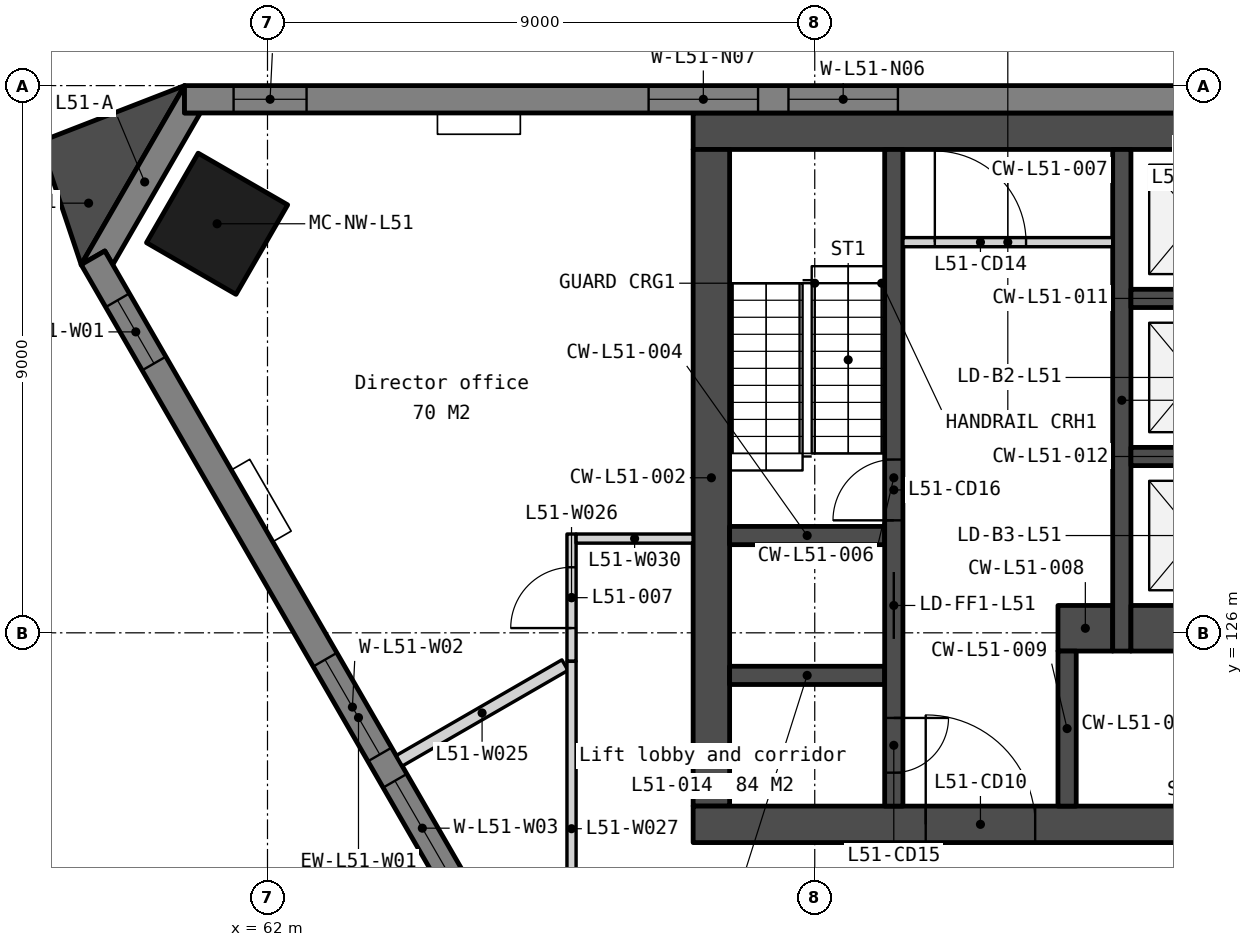
"""IFC4 building model, lengths in metres.
Left out: names, types, materials, properties, quantities, classifications, styles, units other than length and angle.
Written with IfcOpenShell. Run it as: python <this file> out.ifc"""

import sys

from ifc_helpers import new_model, si_unit, direction, frame, frame_2d, origin, origin_2d, place, context, subcontext, project, spatial, polyline, rectangle, outline, extrude, element, fill, save


model = new_model("IFC4")
c1 = context("Model", 3, precision=1e-05, world=origin(), true_north=direction((0.0, 1.0)))
c2 = subcontext(c1, "Body", "Model", "MODEL_VIEW")
j1 = project(units=[si_unit("LENGTHUNIT", "METRE"), si_unit("PLANEANGLEUNIT", "RADIAN")], contexts=[c1])
p1 = place(None, origin())
s1 = spatial("IfcSite", under=j1, at=p1, CompositionType="ELEMENT")
p2 = place(p1, origin())
s2 = spatial("IfcBuilding", under=s1, at=p2, CompositionType="ELEMENT")
p3 = place(p2, frame((0.0, 0.0, 203.6)))
s3 = spatial("IfcBuildingStorey", under=s2, at=p3, CompositionType="ELEMENT", Elevation=203.6)
p4 = place(p3, frame((61.171, 132.728, 0.0), z_axis=(0.0, 0.0, 1.0), x_axis=(-0.5, -0.866025403784, 0.0)))
e1 = element("IfcColumn", 1, at=p4, inside=s3, PredefinedType="COLUMN", context=c2, shape_type="SweptSolid", body=[
    extrude(rectangle(XDim=1.7, YDim=1.7, at=origin_2d()), origin(), (0.0, 0.0, 1.0), 3.9),
])
p5 = place(p3, frame((69.0, 134.25, 0.0), z_axis=(0.0, 0.0, 1.0), x_axis=(1.0, 0.0, 0.0)))
e2 = element("IfcWall", 2, at=p5, inside=s3, PredefinedType="SOLIDWALL", context=c2, shape_type="SweptSolid", body=[
    extrude(rectangle(XDim=22.0, YDim=0.6, at=frame_2d((11.0, 0.0))), origin(), (0.0, 0.0, 1.0), 3.75),
])
p6 = place(p3, frame((69.3, 133.95, 0.0), z_axis=(0.0, 0.0, 1.0), x_axis=(0.0, -1.0, 0.0)))
e3 = element("IfcWall", 3, at=p6, inside=s3, PredefinedType="SOLIDWALL", context=c2, shape_type="SweptSolid", body=[
    extrude(rectangle(XDim=10.8, YDim=0.6, at=frame_2d((5.4, 0.0))), origin(), (0.0, 0.0, 1.0), 3.75),
])
p7 = place(p3, frame((69.0, 122.85, 0.0), z_axis=(0.0, 0.0, 1.0), x_axis=(1.0, 0.0, 0.0)))
e4 = element("IfcWall", 4, at=p7, inside=s3, PredefinedType="SOLIDWALL", context=c2, shape_type="SweptSolid", body=[
    extrude(rectangle(XDim=22.0, YDim=0.6, at=frame_2d((11.0, 0.0))), origin(), (0.0, 0.0, 1.0), 3.75),
])
p8 = place(p7, frame((16.375, 0.0, 0.0)))
e5 = element("IfcOpeningElement", 5, at=p8, cuts=e4, PredefinedType="OPENING", context=c2, shape_type="SweptSolid", body=[
    extrude(rectangle(XDim=1.8, YDim=2.1, at=frame_2d((0.9, 1.05))), frame((0.0, 0.31, 0.0), z_axis=(0.0, -1.0, 0.0), x_axis=(1.0, 0.0, 0.0)), (0.0, 0.0, 1.0), 0.62),
])
p9 = place(p7, frame((3.825, 0.0, 0.0)))
e6 = element("IfcOpeningElement", 6, at=p9, cuts=e4, PredefinedType="OPENING", context=c2, shape_type="SweptSolid", body=[
    extrude(rectangle(XDim=1.8, YDim=2.1, at=frame_2d((0.9, 1.05))), frame((0.0, 0.31, 0.0), z_axis=(0.0, -1.0, 0.0), x_axis=(1.0, 0.0, 0.0)), (0.0, 0.0, 1.0), 0.62),
])
p10 = place(p7, frame((12.85, 0.0, 0.0)))
e7 = element("IfcOpeningElement", 7, at=p10, cuts=e4, PredefinedType="OPENING", context=c2, shape_type="SweptSolid", body=[
    extrude(rectangle(XDim=1.5, YDim=2.1, at=frame_2d((0.75, 1.05))), frame((0.0, 0.31, 0.0), z_axis=(0.0, -1.0, 0.0), x_axis=(1.0, 0.0, 0.0)), (0.0, 0.0, 1.0), 0.62),
])
for number, where, z_axis, x_axis in (
    (8, (69.6, 127.6, 0.0), (0.0, 0.0, 1.0), (1.0, 0.0, 0.0)),
    (9, (69.6, 125.3, 0.0), (0.0, 0.0, 1.0), (1.0, 0.0, 0.0)),
):
    element("IfcWall", number, at=place(p3, frame(where, z_axis=z_axis, x_axis=x_axis)), inside=s3, PredefinedType="SOLIDWALL", context=c2, shape_type="SweptSolid", body=[
        extrude(rectangle(XDim=2.55, YDim=0.3, at=frame_2d((1.275, 0.0))), origin(), (0.0, 0.0, 1.0), 3.75),
    ])
p11 = place(p3, frame((72.3, 133.95, 0.0), z_axis=(0.0, 0.0, 1.0), x_axis=(0.0, -1.0, 0.0)))
e10 = element("IfcWall", 10, at=p11, inside=s3, PredefinedType="SOLIDWALL", context=c2, shape_type="SweptSolid", body=[
    extrude(rectangle(XDim=10.8, YDim=0.3, at=frame_2d((5.4, 0.0))), origin(), (0.0, 0.0, 1.0), 3.75),
])
p12 = place(p11, frame((6.95, 0.0, 0.0)))
e11 = element("IfcOpeningElement", 11, at=p12, cuts=e10, PredefinedType="OPENING", context=c2, shape_type="SweptSolid", body=[
    extrude(rectangle(XDim=1.1, YDim=2.1, at=frame_2d((0.55, 1.05))), frame((0.0, 0.16, 0.0), z_axis=(0.0, -1.0, 0.0), x_axis=(1.0, 0.0, 0.0)), (0.0, 0.0, 1.0), 0.32),
])
p13 = place(p11, frame((9.35, 0.0, 0.0)))
e12 = element("IfcOpeningElement", 12, at=p13, cuts=e10, PredefinedType="OPENING", context=c2, shape_type="SweptSolid", body=[
    extrude(rectangle(XDim=0.9, YDim=2.1, at=frame_2d((0.45, 1.05))), frame((0.0, 0.16, 0.0), z_axis=(0.0, -1.0, 0.0), x_axis=(1.0, 0.0, 0.0)), (0.0, 0.0, 1.0), 0.32),
])
p14 = place(p11, frame((5.1, 0.0, 0.0)))
e13 = element("IfcOpeningElement", 13, at=p14, cuts=e10, PredefinedType="OPENING", context=c2, shape_type="SweptSolid", body=[
    extrude(rectangle(XDim=1.0, YDim=2.1, at=frame_2d((0.5, 1.05))), frame((0.0, 0.16, 0.0), z_axis=(0.0, -1.0, 0.0), x_axis=(1.0, 0.0, 0.0)), (0.0, 0.0, 1.0), 0.32),
])
p15 = place(p3, frame((72.45, 132.425, 0.0), z_axis=(0.0, 0.0, 1.0), x_axis=(1.0, 0.0, 0.0)))
e14 = element("IfcWall", 14, at=p15, inside=s3, PredefinedType="PARTITIONING", context=c2, shape_type="SweptSolid", body=[
    extrude(rectangle(XDim=3.45, YDim=0.15, at=frame_2d((1.725, 0.0))), origin(), (0.0, 0.0, 1.0), 3.75),
])
p16 = place(p15, frame((0.525, 0.0, 0.0)))
e15 = element("IfcOpeningElement", 15, at=p16, cuts=e14, PredefinedType="OPENING", context=c2, shape_type="SweptSolid", body=[
    extrude(rectangle(XDim=1.5, YDim=2.1, at=frame_2d((0.75, 1.05))), frame((0.0, 0.085, 0.0), z_axis=(0.0, -1.0, 0.0), x_axis=(1.0, 0.0, 0.0)), (0.0, 0.0, 1.0), 0.17),
])
p17 = place(p3, frame((75.0, 126.075, 0.0), z_axis=(0.0, 0.0, 1.0), x_axis=(1.0, 0.0, 0.0)))
e16 = element("IfcWall", 16, at=p17, inside=s3, PredefinedType="SOLIDWALL", context=c2, shape_type="SweptSolid", body=[
    extrude(rectangle(XDim=0.9, YDim=0.75, at=frame_2d((0.45, 0.0))), origin(), (0.0, 0.0, 1.0), 3.75),
])
p18 = place(p3, frame((75.15, 125.7, 0.0), z_axis=(0.0, 0.0, 1.0), x_axis=(0.0, -1.0, 0.0)))
e17 = element("IfcWall", 17, at=p18, inside=s3, PredefinedType="SOLIDWALL", context=c2, shape_type="SweptSolid", body=[
    extrude(rectangle(XDim=2.55, YDim=0.3, at=frame_2d((1.275, 0.0))), origin(), (0.0, 0.0, 1.0), 3.75),
])
p19 = place(p3, frame((76.05, 133.95, 0.0), z_axis=(0.0, 0.0, 1.0), x_axis=(0.0, -1.0, 0.0)))
e18 = element("IfcWall", 18, at=p19, inside=s3, PredefinedType="SOLIDWALL", context=c2, shape_type="SweptSolid", body=[
    extrude(rectangle(XDim=8.25, YDim=0.3, at=frame_2d((4.125, 0.0))), origin(), (0.0, 0.0, 1.0), 3.75),
])
for number, where, z_axis, x_axis in (
    (19, (76.2, 131.5, 0.0), (0.0, 0.0, 1.0), (1.0, 0.0, 0.0)),
    (20, (76.2, 128.9, 0.0), (0.0, 0.0, 1.0), (1.0, 0.0, 0.0)),
):
    element("IfcWall", number, at=place(p3, frame(where, z_axis=z_axis, x_axis=x_axis)), inside=s3, PredefinedType="SOLIDWALL", context=c2, shape_type="SweptSolid", body=[
        extrude(rectangle(XDim=2.1, YDim=0.3, at=frame_2d((1.05, 0.0))), origin(), (0.0, 0.0, 1.0), 3.75),
    ])
p20 = place(p3, frame((76.2, 126.075, 0.0), z_axis=(0.0, 0.0, 1.0), x_axis=(1.0, 0.0, 0.0)))
e21 = element("IfcWall", 21, at=p20, inside=s3, PredefinedType="SOLIDWALL", context=c2, shape_type="SweptSolid", body=[
    extrude(rectangle(XDim=2.1, YDim=0.75, at=frame_2d((1.05, 0.0))), origin(), (0.0, 0.0, 1.0), 3.75),
])
p21 = place(p3, frame((0.0, 0.0, -0.15)))
e22 = element("IfcWall", 22, at=p21, inside=s3, PredefinedType="SOLIDWALL", context=c2, shape_type="SweptSolid", body=[
    extrude(outline(polyline([(60.635, 135.0), (60.635, 134.55), (60.895, 134.55), (59.455, 132.055), (59.325, 132.281), (58.935, 132.055), (60.635, 135.0)])), origin(), (0.0, 0.0, 1.0), 3.9),
])
p22 = place(p3, frame((99.365, 134.775, -0.15), z_axis=(0.0, 0.0, 1.0), x_axis=(-1.0, 0.0, 0.0)))
e23 = element("IfcWall", 23, at=p22, inside=s3, PredefinedType="SOLIDWALL", context=c2, shape_type="SweptSolid", body=[
    extrude(outline(polyline([(38.729, 0.0), (38.729, 3.9), (0.0, 3.9), (0.0, 0.0), (38.729, 0.0)])), frame((0.0, 0.225, 0.0), z_axis=(0.0, -1.0, 0.0), x_axis=(1.0, 0.0, 0.0)), (0.0, 0.0, 1.0), 0.45),
])
p23 = place(p22, frame((0.807, 0.0, 0.95)))
e24 = element("IfcOpeningElement", 24, at=p23, cuts=e23, PredefinedType="OPENING", context=c2, shape_type="SweptSolid", body=[
    extrude(rectangle(XDim=1.2, YDim=2.2, at=frame_2d((0.6, 1.1))), frame((0.0, 0.235, 0.0), z_axis=(0.0, -1.0, 0.0), x_axis=(1.0, 0.0, 0.0)), (0.0, 0.0, 1.0), 0.47),
])
p24 = place(p22, frame((7.632, 0.0, 0.95)))
e25 = element("IfcOpeningElement", 25, at=p24, cuts=e23, PredefinedType="OPENING", context=c2, shape_type="SweptSolid", body=[
    extrude(rectangle(XDim=1.8, YDim=2.2, at=frame_2d((0.9, 1.1))), frame((0.0, 0.235, 0.0), z_axis=(0.0, -1.0, 0.0), x_axis=(1.0, 0.0, 0.0)), (0.0, 0.0, 1.0), 0.47),
])
p25 = place(p22, frame((9.932, 0.0, 0.95)))
e26 = element("IfcOpeningElement", 26, at=p25, cuts=e23, PredefinedType="OPENING", context=c2, shape_type="SweptSolid", body=[
    extrude(rectangle(XDim=1.8, YDim=2.2, at=frame_2d((0.9, 1.1))), frame((0.0, 0.235, 0.0), z_axis=(0.0, -1.0, 0.0), x_axis=(1.0, 0.0, 0.0)), (0.0, 0.0, 1.0), 0.47),
])
p26 = place(p22, frame((17.315, 0.0, 0.95)))
e27 = element("IfcOpeningElement", 27, at=p26, cuts=e23, PredefinedType="OPENING", context=c2, shape_type="SweptSolid", body=[
    extrude(rectangle(XDim=1.8, YDim=2.2, at=frame_2d((0.9, 1.1))), frame((0.0, 0.235, 0.0), z_axis=(0.0, -1.0, 0.0), x_axis=(1.0, 0.0, 0.0)), (0.0, 0.0, 1.0), 0.47),
])
p27 = place(p22, frame((19.615, 0.0, 0.95)))
e28 = element("IfcOpeningElement", 28, at=p27, cuts=e23, PredefinedType="OPENING", context=c2, shape_type="SweptSolid", body=[
    extrude(rectangle(XDim=1.8, YDim=2.2, at=frame_2d((0.9, 1.1))), frame((0.0, 0.235, 0.0), z_axis=(0.0, -1.0, 0.0), x_axis=(1.0, 0.0, 0.0)), (0.0, 0.0, 1.0), 0.47),
])
p28 = place(p22, frame((26.997, 0.0, 0.95)))
e29 = element("IfcOpeningElement", 29, at=p28, cuts=e23, PredefinedType="OPENING", context=c2, shape_type="SweptSolid", body=[
    extrude(rectangle(XDim=1.8, YDim=2.2, at=frame_2d((0.9, 1.1))), frame((0.0, 0.235, 0.0), z_axis=(0.0, -1.0, 0.0), x_axis=(1.0, 0.0, 0.0)), (0.0, 0.0, 1.0), 0.47),
])
p29 = place(p22, frame((29.297, 0.0, 0.95)))
e30 = element("IfcOpeningElement", 30, at=p29, cuts=e23, PredefinedType="OPENING", context=c2, shape_type="SweptSolid", body=[
    extrude(rectangle(XDim=1.8, YDim=2.2, at=frame_2d((0.9, 1.1))), frame((0.0, 0.235, 0.0), z_axis=(0.0, -1.0, 0.0), x_axis=(1.0, 0.0, 0.0)), (0.0, 0.0, 1.0), 0.47),
])
p30 = place(p22, frame((36.722, 0.0, 0.95)))
e31 = element("IfcOpeningElement", 31, at=p30, cuts=e23, PredefinedType="OPENING", context=c2, shape_type="SweptSolid", body=[
    extrude(rectangle(XDim=1.2, YDim=2.2, at=frame_2d((0.6, 1.1))), frame((0.0, 0.235, 0.0), z_axis=(0.0, -1.0, 0.0), x_axis=(1.0, 0.0, 0.0)), (0.0, 0.0, 1.0), 0.47),
])
p31 = place(p3, frame((59.13, 132.168, -0.15), z_axis=(0.0, 0.0, 1.0), x_axis=(0.500006012489, -0.866021932445, 0.0)))
e32 = element("IfcWall", 32, at=p31, inside=s3, PredefinedType="SOLIDWALL", context=c2, shape_type="SweptSolid", body=[
    extrude(outline(polyline([(0.0, 0.0), (0.0, 3.9), (17.465, 3.9), (17.465, 0.0), (0.0, 0.0)])), frame((0.0, 0.225, 0.0), z_axis=(0.0, -1.0, 0.0), x_axis=(1.0, 0.0, 0.0)), (0.0, 0.0, 1.0), 0.45),
])
p32 = place(p31, frame((0.807, 0.0, 0.95)))
e33 = element("IfcOpeningElement", 33, at=p32, cuts=e32, PredefinedType="OPENING", context=c2, shape_type="SweptSolid", body=[
    extrude(rectangle(XDim=1.2, YDim=2.2, at=frame_2d((0.6, 1.1))), frame((0.0, 0.235, 0.0), z_axis=(0.0, -1.0, 0.0), x_axis=(1.0, 0.0, 0.0)), (0.0, 0.0, 1.0), 0.47),
])
p33 = place(p31, frame((7.632, 0.0, 0.95)))
e34 = element("IfcOpeningElement", 34, at=p33, cuts=e32, PredefinedType="OPENING", context=c2, shape_type="SweptSolid", body=[
    extrude(rectangle(XDim=1.8, YDim=2.2, at=frame_2d((0.9, 1.1))), frame((0.0, 0.235, 0.0), z_axis=(0.0, -1.0, 0.0), x_axis=(1.0, 0.0, 0.0)), (0.0, 0.0, 1.0), 0.47),
])
p34 = place(p31, frame((9.932, 0.0, 0.95)))
e35 = element("IfcOpeningElement", 35, at=p34, cuts=e32, PredefinedType="OPENING", context=c2, shape_type="SweptSolid", body=[
    extrude(rectangle(XDim=1.8, YDim=2.2, at=frame_2d((0.9, 1.1))), frame((0.0, 0.235, 0.0), z_axis=(0.0, -1.0, 0.0), x_axis=(1.0, 0.0, 0.0)), (0.0, 0.0, 1.0), 0.47),
])
p35 = place(p3, frame((0.0, 0.0, -0.15)))
e36 = element("IfcWall", 36, at=p35, inside=s3, PredefinedType="SOLIDWALL", context=c2, shape_type="SweptSolid", body=[
    extrude(outline(polyline([(60.635, 135.0), (58.258, 134.078), (58.935, 132.055), (60.635, 135.0)])), origin(), (0.0, 0.0, 1.0), 3.9),
])
p36 = place(p3, frame((64.166, 123.896, 0.0), z_axis=(0.0, 0.0, 1.0), x_axis=(0.866024095498, 0.500002266011, 0.0)))
e37 = element("IfcWall", 37, at=p36, inside=s3, PredefinedType="PARTITIONING", context=c2, shape_type="SweptSolid", body=[
    extrude(rectangle(XDim=3.147, YDim=0.2, at=frame_2d((1.573, 0.0))), origin(), (0.0, 0.0, 1.0), 3.75),
])
p37 = place(p3, frame((67.0, 125.531, 0.0), z_axis=(0.0, 0.0, 1.0), x_axis=(0.0, 1.0, 0.0)))
e38 = element("IfcWall", 38, at=p37, inside=s3, PredefinedType="PARTITIONING", context=c2, shape_type="SweptSolid", body=[
    extrude(rectangle(XDim=2.094, YDim=0.15, at=frame_2d((1.047, 0.0))), origin(), (0.0, 0.0, 1.0), 3.75),
])
p38 = place(p37, frame((0.547, 0.0, 0.0)))
e39 = element("IfcOpeningElement", 39, at=p38, cuts=e38, PredefinedType="OPENING", context=c2, shape_type="SweptSolid", body=[
    extrude(rectangle(XDim=1.0, YDim=2.1, at=frame_2d((0.5, 1.05))), frame((0.0, 0.085, 0.0), z_axis=(0.0, -1.0, 0.0), x_axis=(1.0, 0.0, 0.0)), (0.0, 0.0, 1.0), 0.17),
])
p39 = place(p3, frame((67.0, 120.025, 0.0), z_axis=(0.0, 0.0, 1.0), x_axis=(0.0, 1.0, 0.0)))
e40 = element("IfcWall", 40, at=p39, inside=s3, PredefinedType="PARTITIONING", context=c2, shape_type="SweptSolid", body=[
    extrude(rectangle(XDim=5.507, YDim=0.15, at=frame_2d((2.753, 0.0))), origin(), (0.0, 0.0, 1.0), 3.75),
])
p40 = place(p3, frame((67.075, 127.55, 0.0), z_axis=(0.0, 0.0, 1.0), x_axis=(1.0, 0.0, 0.0)))
e41 = element("IfcWall", 41, at=p40, inside=s3, PredefinedType="PARTITIONING", context=c2, shape_type="SweptSolid", body=[
    extrude(rectangle(XDim=1.925, YDim=0.15, at=frame_2d((0.962, 0.0))), origin(), (0.0, 0.0, 1.0), 3.75),
])
p41 = place(p12, origin())
e42 = element("IfcDoor", 42, at=p41, inside=s3, OperationType="SLIDING_TO_LEFT", PredefinedType="DOOR", context=c2, shape_type="SweptSolid", body=[
    extrude(rectangle(XDim=1.1, YDim=2.1, at=frame_2d((0.55, 1.05))), frame((0.0, 0.025, 0.0), z_axis=(0.0, -1.0, 0.0), x_axis=(1.0, 0.0, 0.0)), (0.0, 0.0, 1.0), 0.05),
])
fill(e11, e42)
p42 = place(p9, origin())
e43 = element("IfcDoor", 43, at=p42, inside=s3, OperationType="DOUBLE_DOOR_DOUBLE_SWING", PredefinedType="DOOR", context=c2, shape_type="SweptSolid", body=[
    extrude(rectangle(XDim=1.8, YDim=2.1, at=frame_2d((0.9, 1.05))), frame((0.0, 0.025, 0.0), z_axis=(0.0, -1.0, 0.0), x_axis=(1.0, 0.0, 0.0)), (0.0, 0.0, 1.0), 0.05),
])
fill(e6, e43)
p43 = place(p16, origin())
e44 = element("IfcDoor", 44, at=p43, inside=s3, OperationType="DOUBLE_DOOR_DOUBLE_SWING", PredefinedType="DOOR", context=c2, shape_type="SweptSolid", body=[
    extrude(rectangle(XDim=1.5, YDim=2.1, at=frame_2d((0.75, 1.05))), frame((0.0, 0.025, 0.0), z_axis=(0.0, -1.0, 0.0), x_axis=(1.0, 0.0, 0.0)), (0.0, 0.0, 1.0), 0.05),
])
fill(e15, e44)
p44 = place(p13, origin())
e45 = element("IfcDoor", 45, at=p44, inside=s3, OperationType="SINGLE_SWING_LEFT", PredefinedType="DOOR", context=c2, shape_type="SweptSolid", body=[
    extrude(rectangle(XDim=0.9, YDim=2.1, at=frame_2d((0.45, 1.05))), frame((0.0, 0.025, 0.0), z_axis=(0.0, -1.0, 0.0), x_axis=(1.0, 0.0, 0.0)), (0.0, 0.0, 1.0), 0.05),
])
fill(e12, e45)
p45 = place(p14, origin())
e46 = element("IfcDoor", 46, at=p45, inside=s3, OperationType="SINGLE_SWING_RIGHT", PredefinedType="DOOR", context=c2, shape_type="SweptSolid", body=[
    extrude(rectangle(XDim=1.0, YDim=2.1, at=frame_2d((0.5, 1.05))), frame((0.0, 0.025, 0.0), z_axis=(0.0, -1.0, 0.0), x_axis=(1.0, 0.0, 0.0)), (0.0, 0.0, 1.0), 0.05),
])
fill(e13, e46)
p46 = place(p28, origin())
e47 = element("IfcWindow", 47, at=p46, inside=s3, PartitioningType="SINGLE_PANEL", PredefinedType="WINDOW", context=c2, shape_type="SweptSolid", body=[
    extrude(rectangle(XDim=1.8, YDim=2.2, at=frame_2d((0.9, 1.1))), frame((0.0, 0.03, 0.0), z_axis=(0.0, -1.0, 0.0), x_axis=(1.0, 0.0, 0.0)), (0.0, 0.0, 1.0), 0.06),
])
fill(e29, e47)
p47 = place(p29, origin())
e48 = element("IfcWindow", 48, at=p47, inside=s3, PartitioningType="SINGLE_PANEL", PredefinedType="WINDOW", context=c2, shape_type="SweptSolid", body=[
    extrude(rectangle(XDim=1.8, YDim=2.2, at=frame_2d((0.9, 1.1))), frame((0.0, 0.03, 0.0), z_axis=(0.0, -1.0, 0.0), x_axis=(1.0, 0.0, 0.0)), (0.0, 0.0, 1.0), 0.06),
])
fill(e30, e48)
p48 = place(p30, origin())
e49 = element("IfcWindow", 49, at=p48, inside=s3, PartitioningType="SINGLE_PANEL", PredefinedType="WINDOW", context=c2, shape_type="SweptSolid", body=[
    extrude(rectangle(XDim=1.2, YDim=2.2, at=frame_2d((0.6, 1.1))), frame((0.0, 0.03, 0.0), z_axis=(0.0, -1.0, 0.0), x_axis=(1.0, 0.0, 0.0)), (0.0, 0.0, 1.0), 0.06),
])
fill(e31, e49)
p49 = place(p32, origin())
e50 = element("IfcWindow", 50, at=p49, inside=s3, PartitioningType="SINGLE_PANEL", PredefinedType="WINDOW", context=c2, shape_type="SweptSolid", body=[
    extrude(rectangle(XDim=1.2, YDim=2.2, at=frame_2d((0.6, 1.1))), frame((0.0, 0.03, 0.0), z_axis=(0.0, -1.0, 0.0), x_axis=(1.0, 0.0, 0.0)), (0.0, 0.0, 1.0), 0.06),
])
fill(e33, e50)
p50 = place(p33, origin())
e51 = element("IfcWindow", 51, at=p50, inside=s3, PartitioningType="SINGLE_PANEL", PredefinedType="WINDOW", context=c2, shape_type="SweptSolid", body=[
    extrude(rectangle(XDim=1.8, YDim=2.2, at=frame_2d((0.9, 1.1))), frame((0.0, 0.03, 0.0), z_axis=(0.0, -1.0, 0.0), x_axis=(1.0, 0.0, 0.0)), (0.0, 0.0, 1.0), 0.06),
])
fill(e34, e51)
p51 = place(p34, origin())
e52 = element("IfcWindow", 52, at=p51, inside=s3, PartitioningType="SINGLE_PANEL", PredefinedType="WINDOW", context=c2, shape_type="SweptSolid", body=[
    extrude(rectangle(XDim=1.8, YDim=2.2, at=frame_2d((0.9, 1.1))), frame((0.0, 0.03, 0.0), z_axis=(0.0, -1.0, 0.0), x_axis=(1.0, 0.0, 0.0)), (0.0, 0.0, 1.0), 0.06),
])
fill(e35, e52)
p52 = place(p38, origin())
e53 = element("IfcDoor", 53, at=p52, inside=s3, OperationType="SINGLE_SWING_LEFT", PredefinedType="DOOR", context=c2, shape_type="SweptSolid", body=[
    extrude(rectangle(XDim=1.0, YDim=2.1, at=frame_2d((0.5, 1.05))), frame((0.0, 0.025, 0.0), z_axis=(0.0, -1.0, 0.0), x_axis=(1.0, 0.0, 0.0)), (0.0, 0.0, 1.0), 0.05),
])
fill(e39, e53)
save(model, sys.argv[1])
